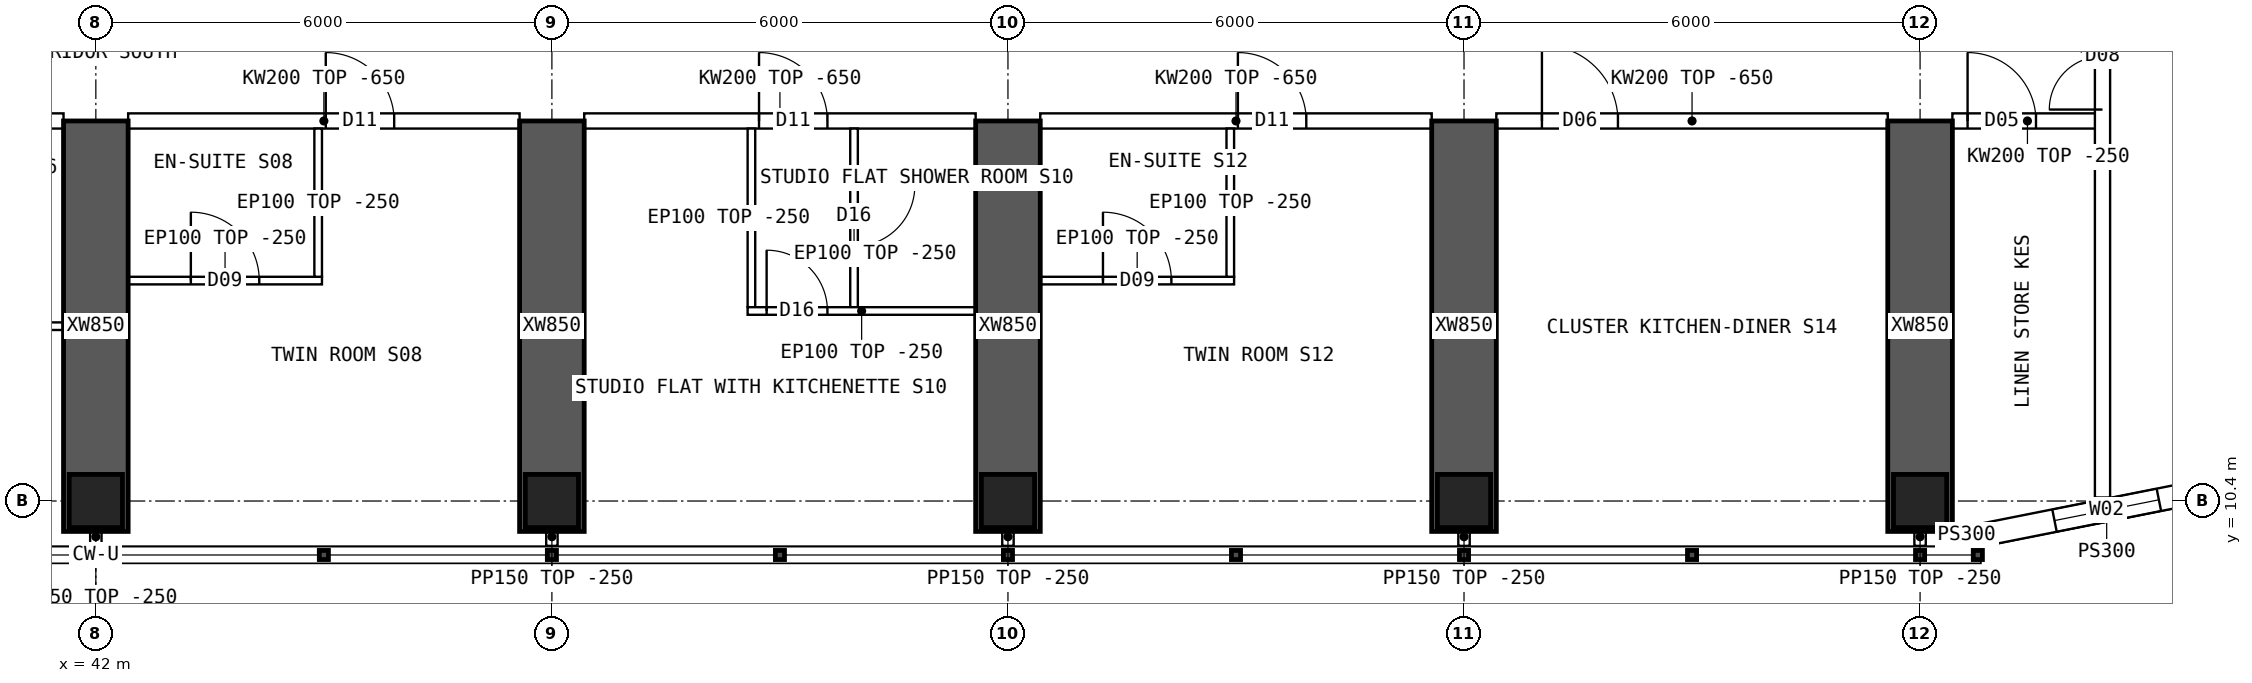
"""IFC4 building model, lengths in metres.
Left out: names, types, materials, properties, quantities, classifications, styles, units other than length and angle.
Written with IfcOpenShell. Run it as: python <this file> out.ifc"""

import sys

from ifc_helpers import new_model, si_unit, direction, frame, frame_2d, origin, origin_2d, place, context, subcontext, project, spatial, polyline, rectangle, hollow_rectangle, outline, extrude, element, fill, save


model = new_model("IFC4")
c1 = context("Model", 3, precision=1e-05, world=origin(), true_north=direction((0.0, 1.0)))
c2 = subcontext(c1, "Body", "Model", "MODEL_VIEW")
j1 = project(units=[si_unit("LENGTHUNIT", "METRE"), si_unit("PLANEANGLEUNIT", "RADIAN")], contexts=[c1])
p1 = place(None, origin())
s1 = spatial("IfcSite", under=j1, at=p1, CompositionType="ELEMENT")
p2 = place(p1, origin())
s2 = spatial("IfcBuilding", under=s1, at=p2, CompositionType="ELEMENT")
p3 = place(p2, frame((0.0, 0.0, 163.6)))
s3 = spatial("IfcBuildingStorey", under=s2, at=p3, CompositionType="ELEMENT", Elevation=163.6)
for number, where, z_axis, x_axis in (
    (1, (42.0, 10.4, 0.0), (0.0, 0.0, 1.0), (1.0, 0.0, 0.0)),
    (2, (48.0, 10.4, 0.0), (0.0, 0.0, 1.0), (1.0, 0.0, 0.0)),
    (3, (54.0, 10.4, 0.0), (0.0, 0.0, 1.0), (1.0, 0.0, 0.0)),
    (4, (60.0, 10.4, 0.0), (0.0, 0.0, 1.0), (1.0, 0.0, 0.0)),
    (5, (66.0, 10.4, 0.0), (0.0, 0.0, 1.0), (1.0, 0.0, 0.0)),
):
    element("IfcColumn", number, at=place(p3, frame(where, z_axis=z_axis, x_axis=x_axis)), inside=s3, PredefinedType="COLUMN", context=c2, shape_type="SweptSolid", body=[
        extrude(hollow_rectangle(XDim=0.7, YDim=0.7, WallThickness=0.07, at=origin_2d()), origin(), (0.0, 0.0, 1.0), 3.75),
    ])
for number, where, z_axis, x_axis in (
    (6, (42.0, 10.0, 0.0), (0.0, 0.0, 1.0), (0.0, 1.0, 0.0)),
    (7, (48.0, 10.0, 0.0), (0.0, 0.0, 1.0), (0.0, 1.0, 0.0)),
    (8, (54.0, 10.0, 0.0), (0.0, 0.0, 1.0), (0.0, 1.0, 0.0)),
    (9, (60.0, 10.0, 0.0), (0.0, 0.0, 1.0), (0.0, 1.0, 0.0)),
    (10, (66.0, 10.0, 0.0), (0.0, 0.0, 1.0), (0.0, 1.0, 0.0)),
):
    element("IfcWall", number, at=place(p3, frame(where, z_axis=z_axis, x_axis=x_axis)), inside=s3, PredefinedType="SHEAR", context=c2, shape_type="SweptSolid", body=[
        extrude(rectangle(XDim=5.4, YDim=0.85, at=frame_2d((2.7, 0.0))), origin(), (0.0, 0.0, 1.0), 3.75),
    ])
p4 = place(p3, frame((66.8, 9.95, 0.0), z_axis=(0.0, 0.0, 1.0), x_axis=(0.98078325777, 0.195100490205, 0.0)))
e11 = element("IfcWall", 11, at=p4, inside=s3, PredefinedType="SOLIDWALL", context=c2, shape_type="SweptSolid", body=[
    extrude(outline(polyline([(-0.03, -0.15), (3.405, -0.15), (3.345, 0.15), (0.03, 0.15), (-0.03, -0.15)])), origin(), (0.0, 0.0, 1.0), 3.5),
])
p5 = place(p4, frame((0.988, 0.0, 0.9)))
e12 = element("IfcOpeningElement", 12, at=p5, cuts=e11, PredefinedType="OPENING", context=c2, shape_type="SweptSolid", body=[
    extrude(rectangle(XDim=1.4, YDim=1.8, at=frame_2d((0.7, 0.9))), frame((0.0, 0.16, 0.0), z_axis=(0.0, -1.0, 0.0), x_axis=(1.0, 0.0, 0.0)), (0.0, 0.0, 1.0), 0.32),
])
p6 = place(p3, frame((66.8, 9.95, 0.0), z_axis=(0.0, 0.0, 1.0), x_axis=(-1.0, 0.0, 0.0)))
e13 = element("IfcWall", 13, at=p6, inside=s3, PredefinedType="SOLIDWALL", context=c2, shape_type="SweptSolid", body=[
    extrude(rectangle(XDim=0.375, YDim=0.3, at=frame_2d((0.188, 0.0))), origin(), (0.0, 0.0, 1.0), 3.5),
])
p7 = place(p3, frame((36.425, 15.4, 0.0), z_axis=(0.0, 0.0, 1.0), x_axis=(1.0, 0.0, 0.0)))
e14 = element("IfcWall", 14, at=p7, inside=s3, PredefinedType="SOLIDWALL", context=c2, shape_type="SweptSolid", body=[
    extrude(outline(polyline([(0.0, 0.0), (5.15, 0.0), (5.15, 3.1), (0.0, 3.1), (0.0, 0.0)])), frame((0.0, 0.1, 0.0), z_axis=(0.0, -1.0, 0.0), x_axis=(1.0, 0.0, 0.0)), (0.0, 0.0, 1.0), 0.2),
])
p8 = place(p7, frame((0.3, 0.0, 0.0)))
e15 = element("IfcOpeningElement", 15, at=p8, cuts=e14, PredefinedType="OPENING", context=c2, shape_type="SweptSolid", body=[
    extrude(rectangle(XDim=1.0, YDim=2.1, at=frame_2d((0.5, 1.05))), frame((0.0, 0.11, 0.0), z_axis=(0.0, -1.0, 0.0), x_axis=(1.0, 0.0, 0.0)), (0.0, 0.0, 1.0), 0.22),
])
p9 = place(p3, frame((42.425, 15.4, 0.0), z_axis=(0.0, 0.0, 1.0), x_axis=(1.0, 0.0, 0.0)))
e16 = element("IfcWall", 16, at=p9, inside=s3, PredefinedType="SOLIDWALL", context=c2, shape_type="SweptSolid", body=[
    extrude(outline(polyline([(0.0, 0.0), (5.15, 0.0), (5.15, 3.1), (0.0, 3.1), (0.0, 0.0)])), frame((0.0, 0.1, 0.0), z_axis=(0.0, -1.0, 0.0), x_axis=(1.0, 0.0, 0.0)), (0.0, 0.0, 1.0), 0.2),
])
p10 = place(p9, frame((2.6, 0.0, 0.0)))
e17 = element("IfcOpeningElement", 17, at=p10, cuts=e16, PredefinedType="OPENING", context=c2, shape_type="SweptSolid", body=[
    extrude(rectangle(XDim=0.9, YDim=2.1, at=frame_2d((0.45, 1.05))), frame((0.0, 0.11, 0.0), z_axis=(0.0, -1.0, 0.0), x_axis=(1.0, 0.0, 0.0)), (0.0, 0.0, 1.0), 0.22),
])
p11 = place(p3, frame((48.425, 15.4, 0.0), z_axis=(0.0, 0.0, 1.0), x_axis=(1.0, 0.0, 0.0)))
e18 = element("IfcWall", 18, at=p11, inside=s3, PredefinedType="SOLIDWALL", context=c2, shape_type="SweptSolid", body=[
    extrude(outline(polyline([(0.0, 0.0), (5.15, 0.0), (5.15, 3.1), (0.0, 3.1), (0.0, 0.0)])), frame((0.0, 0.1, 0.0), z_axis=(0.0, -1.0, 0.0), x_axis=(1.0, 0.0, 0.0)), (0.0, 0.0, 1.0), 0.2),
])
p12 = place(p11, frame((2.3, 0.0, 0.0)))
e19 = element("IfcOpeningElement", 19, at=p12, cuts=e18, PredefinedType="OPENING", context=c2, shape_type="SweptSolid", body=[
    extrude(rectangle(XDim=0.9, YDim=2.1, at=frame_2d((0.45, 1.05))), frame((0.0, 0.11, 0.0), z_axis=(0.0, -1.0, 0.0), x_axis=(1.0, 0.0, 0.0)), (0.0, 0.0, 1.0), 0.22),
])
p13 = place(p3, frame((54.425, 15.4, 0.0), z_axis=(0.0, 0.0, 1.0), x_axis=(1.0, 0.0, 0.0)))
e20 = element("IfcWall", 20, at=p13, inside=s3, PredefinedType="SOLIDWALL", context=c2, shape_type="SweptSolid", body=[
    extrude(outline(polyline([(0.0, 0.0), (5.15, 0.0), (5.15, 3.1), (0.0, 3.1), (0.0, 0.0)])), frame((0.0, 0.1, 0.0), z_axis=(0.0, -1.0, 0.0), x_axis=(1.0, 0.0, 0.0)), (0.0, 0.0, 1.0), 0.2),
])
p14 = place(p13, frame((2.6, 0.0, 0.0)))
e21 = element("IfcOpeningElement", 21, at=p14, cuts=e20, PredefinedType="OPENING", context=c2, shape_type="SweptSolid", body=[
    extrude(rectangle(XDim=0.9, YDim=2.1, at=frame_2d((0.45, 1.05))), frame((0.0, 0.11, 0.0), z_axis=(0.0, -1.0, 0.0), x_axis=(1.0, 0.0, 0.0)), (0.0, 0.0, 1.0), 0.22),
])
p15 = place(p3, frame((60.425, 15.4, 0.0), z_axis=(0.0, 0.0, 1.0), x_axis=(1.0, 0.0, 0.0)))
e22 = element("IfcWall", 22, at=p15, inside=s3, PredefinedType="SOLIDWALL", context=c2, shape_type="SweptSolid", body=[
    extrude(outline(polyline([(0.0, 0.0), (5.15, 0.0), (5.15, 3.1), (0.0, 3.1), (0.0, 0.0)])), frame((0.0, 0.1, 0.0), z_axis=(0.0, -1.0, 0.0), x_axis=(1.0, 0.0, 0.0)), (0.0, 0.0, 1.0), 0.2),
])
p16 = place(p15, frame((0.6, 0.0, 0.0)))
e23 = element("IfcOpeningElement", 23, at=p16, cuts=e22, PredefinedType="OPENING", context=c2, shape_type="SweptSolid", body=[
    extrude(rectangle(XDim=1.0, YDim=2.1, at=frame_2d((0.5, 1.05))), frame((0.0, 0.11, 0.0), z_axis=(0.0, -1.0, 0.0), x_axis=(1.0, 0.0, 0.0)), (0.0, 0.0, 1.0), 0.22),
])
p17 = place(p3, frame((66.425, 15.4, 0.0), z_axis=(0.0, 0.0, 1.0), x_axis=(1.0, 0.0, 0.0)))
e24 = element("IfcWall", 24, at=p17, inside=s3, PredefinedType="SOLIDWALL", context=c2, shape_type="SweptSolid", body=[
    extrude(rectangle(XDim=1.975, YDim=0.2, at=frame_2d((0.987, 0.0))), origin(), (0.0, 0.0, 1.0), 3.5),
])
p18 = place(p17, frame((0.2, 0.0, 0.0)))
e25 = element("IfcOpeningElement", 25, at=p18, cuts=e24, PredefinedType="OPENING", context=c2, shape_type="SweptSolid", body=[
    extrude(rectangle(XDim=0.9, YDim=2.1, at=frame_2d((0.45, 1.05))), frame((0.0, 0.11, 0.0), z_axis=(0.0, -1.0, 0.0), x_axis=(1.0, 0.0, 0.0)), (0.0, 0.0, 1.0), 0.22),
])
p19 = place(p3, frame((38.925, 12.7, 0.0), z_axis=(0.0, 0.0, 1.0), x_axis=(1.0, 0.0, 0.0)))
e26 = element("IfcWall", 26, at=p19, inside=s3, PredefinedType="PARTITIONING", context=c2, shape_type="SweptSolid", body=[
    extrude(rectangle(XDim=2.65, YDim=0.1, at=frame_2d((1.325, 0.0))), origin(), (0.0, 0.0, 1.0), 3.5),
])
p20 = place(p3, frame((44.975, 13.3, 0.0), z_axis=(0.0, 0.0, 1.0), x_axis=(-1.0, 0.0, 0.0)))
e27 = element("IfcWall", 27, at=p20, inside=s3, PredefinedType="PARTITIONING", context=c2, shape_type="SweptSolid", body=[
    extrude(rectangle(XDim=2.55, YDim=0.1, at=frame_2d((1.275, 0.0))), origin(), (0.0, 0.0, 1.0), 3.5),
])
p21 = place(p20, frame((0.825, 0.0, 0.0)))
e28 = element("IfcOpeningElement", 28, at=p21, cuts=e27, PredefinedType="OPENING", context=c2, shape_type="SweptSolid", body=[
    extrude(rectangle(XDim=0.9, YDim=2.1, at=frame_2d((0.45, 1.05))), frame((0.0, 0.06, 0.0), z_axis=(0.0, -1.0, 0.0), x_axis=(1.0, 0.0, 0.0)), (0.0, 0.0, 1.0), 0.12),
])
p22 = place(p3, frame((44.925, 13.35, 0.0), z_axis=(0.0, 0.0, 1.0), x_axis=(0.0, 1.0, 0.0)))
e29 = element("IfcWall", 29, at=p22, inside=s3, PredefinedType="PARTITIONING", context=c2, shape_type="SweptSolid", body=[
    extrude(outline(polyline([(0.0, 0.0), (1.95, 0.0), (1.95, 3.1), (1.902, 3.1), (1.9, 3.5), (0.0, 3.5), (0.0, 0.0)])), frame((0.0, 0.05, 0.0), z_axis=(0.0, -1.0, 0.0), x_axis=(1.0, 0.0, 0.0)), (0.0, 0.0, 1.0), 0.1),
])
p23 = place(p3, frame((53.575, 12.9, 0.0), z_axis=(0.0, 0.0, 1.0), x_axis=(-1.0, 0.0, 0.0)))
e30 = element("IfcWall", 30, at=p23, inside=s3, PredefinedType="PARTITIONING", context=c2, shape_type="SweptSolid", body=[
    extrude(rectangle(XDim=3.0, YDim=0.1, at=frame_2d((1.5, 0.0))), origin(), (0.0, 0.0, 1.0), 3.5),
])
p24 = place(p23, frame((1.95, 0.0, 0.0)))
e31 = element("IfcOpeningElement", 31, at=p24, cuts=e30, PredefinedType="OPENING", context=c2, shape_type="SweptSolid", body=[
    extrude(rectangle(XDim=0.8, YDim=2.1, at=frame_2d((0.4, 1.05))), frame((0.0, 0.06, 0.0), z_axis=(0.0, -1.0, 0.0), x_axis=(1.0, 0.0, 0.0)), (0.0, 0.0, 1.0), 0.12),
])
p25 = place(p3, frame((50.625, 12.95, 0.0), z_axis=(0.0, 0.0, 1.0), x_axis=(0.0, 1.0, 0.0)))
e32 = element("IfcWall", 32, at=p25, inside=s3, PredefinedType="PARTITIONING", context=c2, shape_type="SweptSolid", body=[
    extrude(outline(polyline([(0.0, 0.0), (2.35, 0.0), (2.35, 3.1), (2.302, 3.1), (2.3, 3.5), (0.0, 3.5), (0.0, 0.0)])), frame((0.0, 0.05, 0.0), z_axis=(0.0, -1.0, 0.0), x_axis=(1.0, 0.0, 0.0)), (0.0, 0.0, 1.0), 0.1),
])
p26 = place(p3, frame((51.975, 12.95, 0.0), z_axis=(0.0, 0.0, 1.0), x_axis=(0.0, 1.0, 0.0)))
e33 = element("IfcWall", 33, at=p26, inside=s3, PredefinedType="PARTITIONING", context=c2, shape_type="SweptSolid", body=[
    extrude(outline(polyline([(0.0, 0.0), (2.35, 0.0), (2.35, 3.1), (2.302, 3.1), (2.3, 3.5), (0.0, 3.5), (0.0, 0.0)])), frame((0.0, 0.05, 0.0), z_axis=(0.0, -1.0, 0.0), x_axis=(1.0, 0.0, 0.0)), (0.0, 0.0, 1.0), 0.1),
])
p27 = place(p26, frame((0.8, 0.0, 0.0)))
e34 = element("IfcOpeningElement", 34, at=p27, cuts=e33, PredefinedType="OPENING", context=c2, shape_type="SweptSolid", body=[
    extrude(rectangle(XDim=0.8, YDim=2.1, at=frame_2d((0.4, 1.05))), frame((0.0, 0.06, 0.0), z_axis=(0.0, -1.0, 0.0), x_axis=(1.0, 0.0, 0.0)), (0.0, 0.0, 1.0), 0.12),
])
p28 = place(p3, frame((56.975, 13.3, 0.0), z_axis=(0.0, 0.0, 1.0), x_axis=(-1.0, 0.0, 0.0)))
e35 = element("IfcWall", 35, at=p28, inside=s3, PredefinedType="PARTITIONING", context=c2, shape_type="SweptSolid", body=[
    extrude(rectangle(XDim=2.55, YDim=0.1, at=frame_2d((1.275, 0.0))), origin(), (0.0, 0.0, 1.0), 3.5),
])
p29 = place(p28, frame((0.825, 0.0, 0.0)))
e36 = element("IfcOpeningElement", 36, at=p29, cuts=e35, PredefinedType="OPENING", context=c2, shape_type="SweptSolid", body=[
    extrude(rectangle(XDim=0.9, YDim=2.1, at=frame_2d((0.45, 1.05))), frame((0.0, 0.06, 0.0), z_axis=(0.0, -1.0, 0.0), x_axis=(1.0, 0.0, 0.0)), (0.0, 0.0, 1.0), 0.12),
])
p30 = place(p3, frame((56.925, 13.35, 0.0), z_axis=(0.0, 0.0, 1.0), x_axis=(0.0, 1.0, 0.0)))
e37 = element("IfcWall", 37, at=p30, inside=s3, PredefinedType="PARTITIONING", context=c2, shape_type="SweptSolid", body=[
    extrude(outline(polyline([(0.0, 0.0), (1.95, 0.0), (1.95, 3.1), (1.902, 3.1), (1.9, 3.5), (0.0, 3.5), (0.0, 0.0)])), frame((0.0, 0.05, 0.0), z_axis=(0.0, -1.0, 0.0), x_axis=(1.0, 0.0, 0.0)), (0.0, 0.0, 1.0), 0.1),
])
p31 = place(p3, frame((68.4, 10.446, 0.0), z_axis=(0.0, 0.0, 1.0), x_axis=(0.0, 1.0, 0.0)))
e38 = element("IfcWall", 38, at=p31, inside=s3, PredefinedType="SOLIDWALL", context=c2, shape_type="SweptSolid", body=[
    extrude(rectangle(XDim=43.107, YDim=0.2, at=frame_2d((21.554, 0.0))), origin(), (0.0, 0.0, 1.0), 3.5),
])
p32 = place(p31, frame((13.914, 0.0, 0.0)))
e39 = element("IfcOpeningElement", 39, at=p32, cuts=e38, PredefinedType="OPENING", context=c2, shape_type="SweptSolid", body=[
    extrude(rectangle(XDim=1.2, YDim=2.1, at=frame_2d((0.6, 1.05))), frame((0.0, 0.11, 0.0), z_axis=(0.0, -1.0, 0.0), x_axis=(1.0, 0.0, 0.0)), (0.0, 0.0, 1.0), 0.22),
])
p33 = place(p31, frame((22.634, 0.0, 0.0)))
e40 = element("IfcOpeningElement", 40, at=p33, cuts=e38, PredefinedType="OPENING", context=c2, shape_type="SweptSolid", body=[
    extrude(rectangle(XDim=1.2, YDim=2.1, at=frame_2d((0.6, 1.05))), frame((0.0, 0.11, 0.0), z_axis=(0.0, -1.0, 0.0), x_axis=(1.0, 0.0, 0.0)), (0.0, 0.0, 1.0), 0.22),
])
p34 = place(p31, frame((5.104, 0.0, 0.0)))
e41 = element("IfcOpeningElement", 41, at=p34, cuts=e38, PredefinedType="OPENING", context=c2, shape_type="SweptSolid", body=[
    extrude(rectangle(XDim=1.4, YDim=2.1, at=frame_2d((0.7, 1.05))), frame((0.0, 0.11, 0.0), z_axis=(0.0, -1.0, 0.0), x_axis=(1.0, 0.0, 0.0)), (0.0, 0.0, 1.0), 0.22),
])
p35 = place(p31, frame((36.504, 0.0, 0.0)))
e42 = element("IfcOpeningElement", 42, at=p35, cuts=e38, PredefinedType="OPENING", context=c2, shape_type="SweptSolid", body=[
    extrude(rectangle(XDim=1.4, YDim=2.1, at=frame_2d((0.7, 1.05))), frame((0.0, 0.11, 0.0), z_axis=(0.0, -1.0, 0.0), x_axis=(1.0, 0.0, 0.0)), (0.0, 0.0, 1.0), 0.22),
])
for number, where, z_axis, x_axis in (
    (43, (42.0, 10.05, 0.0), (0.0, 0.0, 1.0), (0.0, -1.0, 0.0)),
    (44, (48.0, 10.05, 0.0), (0.0, 0.0, 1.0), (0.0, -1.0, 0.0)),
    (45, (54.0, 10.05, 0.0), (0.0, 0.0, 1.0), (0.0, -1.0, 0.0)),
    (46, (60.0, 10.05, 0.0), (0.0, 0.0, 1.0), (0.0, -1.0, 0.0)),
    (47, (66.0, 10.05, 0.0), (0.0, 0.0, 1.0), (0.0, -1.0, 0.0)),
):
    element("IfcWall", number, at=place(p3, frame(where, z_axis=z_axis, x_axis=x_axis)), inside=s3, PredefinedType="PARTITIONING", context=c2, shape_type="SweptSolid", body=[
        extrude(rectangle(XDim=0.24, YDim=0.15, at=frame_2d((0.12, 0.0))), origin(), (0.0, 0.0, 1.0), 3.5),
    ])
p36 = place(p5, origin())
e48 = element("IfcWindow", 48, at=p36, inside=s3, PartitioningType="SINGLE_PANEL", PredefinedType="WINDOW", context=c2, shape_type="SweptSolid", body=[
    extrude(rectangle(XDim=1.4, YDim=1.8, at=frame_2d((0.7, 0.9))), frame((0.0, 0.03, 0.0), z_axis=(0.0, -1.0, 0.0), x_axis=(1.0, 0.0, 0.0)), (0.0, 0.0, 1.0), 0.06),
])
fill(e12, e48)
p37 = place(p21, origin())
e49 = element("IfcDoor", 49, at=p37, inside=s3, OperationType="SINGLE_SWING_RIGHT", PredefinedType="DOOR", context=c2, shape_type="SweptSolid", body=[
    extrude(rectangle(XDim=0.9, YDim=2.1, at=frame_2d((0.45, 1.05))), frame((0.0, 0.025, 0.0), z_axis=(0.0, -1.0, 0.0), x_axis=(1.0, 0.0, 0.0)), (0.0, 0.0, 1.0), 0.05),
])
fill(e28, e49)
p38 = place(p10, origin())
e50 = element("IfcDoor", 50, at=p38, inside=s3, OperationType="SINGLE_SWING_LEFT", PredefinedType="DOOR", context=c2, shape_type="SweptSolid", body=[
    extrude(rectangle(XDim=0.9, YDim=2.1, at=frame_2d((0.45, 1.05))), frame((0.0, 0.025, 0.0), z_axis=(0.0, -1.0, 0.0), x_axis=(1.0, 0.0, 0.0)), (0.0, 0.0, 1.0), 0.05),
])
fill(e17, e50)
p39 = place(p24, origin())
e51 = element("IfcDoor", 51, at=p39, inside=s3, OperationType="SINGLE_SWING_RIGHT", PredefinedType="DOOR", context=c2, shape_type="SweptSolid", body=[
    extrude(rectangle(XDim=0.8, YDim=2.1, at=frame_2d((0.4, 1.05))), frame((0.0, 0.025, 0.0), z_axis=(0.0, -1.0, 0.0), x_axis=(1.0, 0.0, 0.0)), (0.0, 0.0, 1.0), 0.05),
])
fill(e31, e51)
p40 = place(p27, origin())
e52 = element("IfcDoor", 52, at=p40, inside=s3, OperationType="SINGLE_SWING_RIGHT", PredefinedType="DOOR", context=c2, shape_type="SweptSolid", body=[
    extrude(rectangle(XDim=0.8, YDim=2.1, at=frame_2d((0.4, 1.05))), frame((0.0, 0.025, 0.0), z_axis=(0.0, -1.0, 0.0), x_axis=(1.0, 0.0, 0.0)), (0.0, 0.0, 1.0), 0.05),
])
fill(e34, e52)
p41 = place(p12, origin())
e53 = element("IfcDoor", 53, at=p41, inside=s3, OperationType="SINGLE_SWING_LEFT", PredefinedType="DOOR", context=c2, shape_type="SweptSolid", body=[
    extrude(rectangle(XDim=0.9, YDim=2.1, at=frame_2d((0.45, 1.05))), frame((0.0, 0.025, 0.0), z_axis=(0.0, -1.0, 0.0), x_axis=(1.0, 0.0, 0.0)), (0.0, 0.0, 1.0), 0.05),
])
fill(e19, e53)
p42 = place(p29, origin())
e54 = element("IfcDoor", 54, at=p42, inside=s3, OperationType="SINGLE_SWING_RIGHT", PredefinedType="DOOR", context=c2, shape_type="SweptSolid", body=[
    extrude(rectangle(XDim=0.9, YDim=2.1, at=frame_2d((0.45, 1.05))), frame((0.0, 0.025, 0.0), z_axis=(0.0, -1.0, 0.0), x_axis=(1.0, 0.0, 0.0)), (0.0, 0.0, 1.0), 0.05),
])
fill(e36, e54)
p43 = place(p14, origin())
e55 = element("IfcDoor", 55, at=p43, inside=s3, OperationType="SINGLE_SWING_LEFT", PredefinedType="DOOR", context=c2, shape_type="SweptSolid", body=[
    extrude(rectangle(XDim=0.9, YDim=2.1, at=frame_2d((0.45, 1.05))), frame((0.0, 0.025, 0.0), z_axis=(0.0, -1.0, 0.0), x_axis=(1.0, 0.0, 0.0)), (0.0, 0.0, 1.0), 0.05),
])
fill(e21, e55)
p44 = place(p16, origin())
e56 = element("IfcDoor", 56, at=p44, inside=s3, OperationType="SINGLE_SWING_LEFT", PredefinedType="DOOR", context=c2, shape_type="SweptSolid", body=[
    extrude(rectangle(XDim=1.0, YDim=2.1, at=frame_2d((0.5, 1.05))), frame((0.0, 0.025, 0.0), z_axis=(0.0, -1.0, 0.0), x_axis=(1.0, 0.0, 0.0)), (0.0, 0.0, 1.0), 0.05),
])
fill(e23, e56)
p45 = place(p34, origin())
e57 = element("IfcDoor", 57, at=p45, inside=s3, OperationType="DOUBLE_DOOR_SINGLE_SWING", PredefinedType="DOOR", context=c2, shape_type="SweptSolid", body=[
    extrude(rectangle(XDim=1.4, YDim=2.1, at=frame_2d((0.7, 1.05))), frame((0.0, 0.025, 0.0), z_axis=(0.0, -1.0, 0.0), x_axis=(1.0, 0.0, 0.0)), (0.0, 0.0, 1.0), 0.05),
])
fill(e41, e57)
p46 = place(p18, origin())
e58 = element("IfcDoor", 58, at=p46, inside=s3, OperationType="SINGLE_SWING_LEFT", PredefinedType="DOOR", context=c2, shape_type="SweptSolid", body=[
    extrude(rectangle(XDim=0.9, YDim=2.1, at=frame_2d((0.45, 1.05))), frame((0.0, 0.025, 0.0), z_axis=(0.0, -1.0, 0.0), x_axis=(1.0, 0.0, 0.0)), (0.0, 0.0, 1.0), 0.05),
])
fill(e25, e58)
save(model, sys.argv[1])
